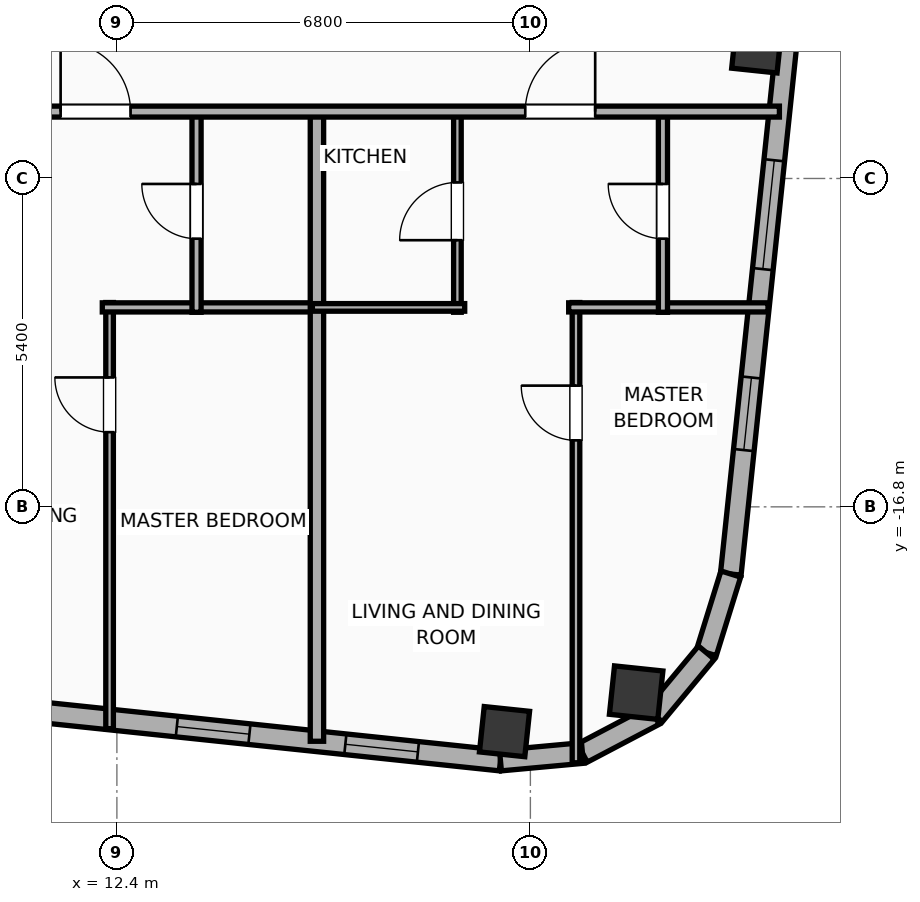
"""IFC4 building model, lengths in metres.
Left out: names, types, materials, properties, quantities, classifications, styles, units other than length and angle.
Written with IfcOpenShell. Run it as: python <this file> out.ifc"""

import sys

from ifc_helpers import new_model, si_unit, direction, frame, frame_2d, origin, origin_2d, place, context, subcontext, project, spatial, rectangle, hollow_rectangle, hollow_circle, extrude, element, fill, save


model = new_model("IFC4")
c1 = context("Model", 3, precision=1e-05, world=origin(), true_north=direction((0.0, 1.0)))
c2 = subcontext(c1, "Body", "Model", "MODEL_VIEW")
j1 = project(units=[si_unit("LENGTHUNIT", "METRE"), si_unit("PLANEANGLEUNIT", "RADIAN")], contexts=[c1])
p1 = place(None, origin())
s1 = spatial("IfcSite", under=j1, at=p1, CompositionType="ELEMENT")
p2 = place(p1, origin())
s2 = spatial("IfcBuilding", under=s1, at=p2, CompositionType="ELEMENT")
p3 = place(p2, frame((0.0, 0.0, 267.8)))
s3 = spatial("IfcBuildingStorey", under=s2, at=p3, CompositionType="ELEMENT", Elevation=267.8)
p4 = place(p3, frame((18.775, -20.497, 0.0), z_axis=(0.0, 0.0, 1.0), x_axis=(0.994521895368, -0.104528463268, 0.0)))
e1 = element("IfcColumn", 1, at=p4, inside=s3, PredefinedType="COLUMN", context=c2, shape_type="SweptSolid", body=[
    extrude(hollow_rectangle(XDim=0.75, YDim=0.75, WallThickness=0.025, at=origin_2d()), origin(), (0.0, 0.0, 1.0), 3.9),
])
p5 = place(p3, frame((20.939, -19.855, 0.0), z_axis=(0.0, 0.0, 1.0), x_axis=(0.994521895368, -0.104528463268, 0.0)))
e2 = element("IfcColumn", 2, at=p5, inside=s3, PredefinedType="COLUMN", context=c2, shape_type="SweptSolid", body=[
    extrude(hollow_circle(Radius=0.4, WallThickness=0.028, at=origin_2d()), origin(), (0.0, 0.0, 1.0), 3.9),
])
p6 = place(p3, frame((22.923, -9.252, 0.0), z_axis=(0.0, 0.0, 1.0), x_axis=(0.994521895368, -0.104528463268, 0.0)))
e3 = element("IfcColumn", 3, at=p6, inside=s3, PredefinedType="COLUMN", context=c2, shape_type="SweptSolid", body=[
    extrude(hollow_rectangle(XDim=0.75, YDim=0.75, WallThickness=0.025, at=origin_2d()), origin(), (0.0, 0.0, 1.0), 3.9),
])
p7 = place(p3, frame((18.708, -20.972, 0.0), z_axis=(0.0, 0.0, 1.0), x_axis=(-0.994521888554, 0.104528528102, 0.0)))
e4 = element("IfcWall", 4, at=p7, inside=s3, PredefinedType="ELEMENTEDWALL", context=c2, shape_type="SweptSolid", body=[
    extrude(rectangle(XDim=46.766, YDim=0.34, at=frame_2d((23.383, 0.0))), origin(), (0.0, 0.0, 1.0), 3.65),
])
p8 = place(p7, frame((23.833, 0.0, 0.75)))
e5 = element("IfcOpeningElement", 5, at=p8, cuts=e4, PredefinedType="OPENING", context=c2, shape_type="SweptSolid", body=[
    extrude(rectangle(XDim=2.4, YDim=2.1, at=frame_2d((1.2, 1.05))), frame((0.0, 0.18, 0.0), z_axis=(0.0, -1.0, 0.0), x_axis=(1.0, 0.0, 0.0)), (0.0, 0.0, 1.0), 0.36),
])
p9 = place(p7, frame((38.622, 0.0, 0.75)))
e6 = element("IfcOpeningElement", 6, at=p9, cuts=e4, PredefinedType="OPENING", context=c2, shape_type="SweptSolid", body=[
    extrude(rectangle(XDim=2.4, YDim=2.1, at=frame_2d((1.2, 1.05))), frame((0.0, 0.18, 0.0), z_axis=(0.0, -1.0, 0.0), x_axis=(1.0, 0.0, 0.0)), (0.0, 0.0, 1.0), 0.36),
])
p10 = place(p7, frame((44.402, 0.0, 0.75)))
e7 = element("IfcOpeningElement", 7, at=p10, cuts=e4, PredefinedType="OPENING", context=c2, shape_type="SweptSolid", body=[
    extrude(rectangle(XDim=1.2, YDim=2.05, at=frame_2d((0.6, 1.025))), frame((0.0, 0.18, 0.0), z_axis=(0.0, -1.0, 0.0), x_axis=(1.0, 0.0, 0.0)), (0.0, 0.0, 1.0), 0.36),
])
p11 = place(p7, frame((42.406, 0.0, 0.75)))
e8 = element("IfcOpeningElement", 8, at=p11, cuts=e4, PredefinedType="OPENING", context=c2, shape_type="SweptSolid", body=[
    extrude(rectangle(XDim=1.2, YDim=2.05, at=frame_2d((0.6, 1.025))), frame((0.0, 0.18, 0.0), z_axis=(0.0, -1.0, 0.0), x_axis=(1.0, 0.0, 0.0)), (0.0, 0.0, 1.0), 0.36),
])
p12 = place(p7, frame((34.933, 0.0, 0.75)))
e9 = element("IfcOpeningElement", 9, at=p12, cuts=e4, PredefinedType="OPENING", context=c2, shape_type="SweptSolid", body=[
    extrude(rectangle(XDim=1.2, YDim=2.05, at=frame_2d((0.6, 1.025))), frame((0.0, 0.18, 0.0), z_axis=(0.0, -1.0, 0.0), x_axis=(1.0, 0.0, 0.0)), (0.0, 0.0, 1.0), 0.36),
])
p13 = place(p7, frame((28.631, 0.0, 0.75)))
e10 = element("IfcOpeningElement", 10, at=p13, cuts=e4, PredefinedType="OPENING", context=c2, shape_type="SweptSolid", body=[
    extrude(rectangle(XDim=1.2, YDim=2.05, at=frame_2d((0.6, 1.025))), frame((0.0, 0.18, 0.0), z_axis=(0.0, -1.0, 0.0), x_axis=(1.0, 0.0, 0.0)), (0.0, 0.0, 1.0), 0.36),
])
p14 = place(p7, frame((30.896, 0.0, 0.75)))
e11 = element("IfcOpeningElement", 11, at=p14, cuts=e4, PredefinedType="OPENING", context=c2, shape_type="SweptSolid", body=[
    extrude(rectangle(XDim=1.2, YDim=2.05, at=frame_2d((0.6, 1.025))), frame((0.0, 0.18, 0.0), z_axis=(0.0, -1.0, 0.0), x_axis=(1.0, 0.0, 0.0)), (0.0, 0.0, 1.0), 0.36),
])
p15 = place(p7, frame((7.497, 0.0, 0.75)))
e12 = element("IfcOpeningElement", 12, at=p15, cuts=e4, PredefinedType="OPENING", context=c2, shape_type="SweptSolid", body=[
    extrude(rectangle(XDim=1.2, YDim=2.05, at=frame_2d((0.6, 1.025))), frame((0.0, 0.18, 0.0), z_axis=(0.0, -1.0, 0.0), x_axis=(1.0, 0.0, 0.0)), (0.0, 0.0, 1.0), 0.36),
])
p16 = place(p7, frame((4.151, 0.0, 0.75)))
e13 = element("IfcOpeningElement", 13, at=p16, cuts=e4, PredefinedType="OPENING", context=c2, shape_type="SweptSolid", body=[
    extrude(rectangle(XDim=1.2, YDim=2.05, at=frame_2d((0.6, 1.025))), frame((0.0, 0.18, 0.0), z_axis=(0.0, -1.0, 0.0), x_axis=(1.0, 0.0, 0.0)), (0.0, 0.0, 1.0), 0.36),
])
p17 = place(p7, frame((1.365, 0.0, 0.75)))
e14 = element("IfcOpeningElement", 14, at=p17, cuts=e4, PredefinedType="OPENING", context=c2, shape_type="SweptSolid", body=[
    extrude(rectangle(XDim=1.2, YDim=2.05, at=frame_2d((0.6, 1.025))), frame((0.0, 0.18, 0.0), z_axis=(0.0, -1.0, 0.0), x_axis=(1.0, 0.0, 0.0)), (0.0, 0.0, 1.0), 0.36),
])
p18 = place(p7, frame((20.254, 0.0, 0.75)))
e15 = element("IfcOpeningElement", 15, at=p18, cuts=e4, PredefinedType="OPENING", context=c2, shape_type="SweptSolid", body=[
    extrude(rectangle(XDim=1.2, YDim=2.05, at=frame_2d((0.6, 1.025))), frame((0.0, 0.18, 0.0), z_axis=(0.0, -1.0, 0.0), x_axis=(1.0, 0.0, 0.0)), (0.0, 0.0, 1.0), 0.36),
])
p19 = place(p7, frame((16.172, 0.0, 0.75)))
e16 = element("IfcOpeningElement", 16, at=p19, cuts=e4, PredefinedType="OPENING", context=c2, shape_type="SweptSolid", body=[
    extrude(rectangle(XDim=1.2, YDim=2.05, at=frame_2d((0.6, 1.025))), frame((0.0, 0.18, 0.0), z_axis=(0.0, -1.0, 0.0), x_axis=(1.0, 0.0, 0.0)), (0.0, 0.0, 1.0), 0.36),
])
p20 = place(p7, frame((12.11, 0.0, 0.75)))
e17 = element("IfcOpeningElement", 17, at=p20, cuts=e4, PredefinedType="OPENING", context=c2, shape_type="SweptSolid", body=[
    extrude(rectangle(XDim=1.2, YDim=2.05, at=frame_2d((0.6, 1.025))), frame((0.0, 0.18, 0.0), z_axis=(0.0, -1.0, 0.0), x_axis=(1.0, 0.0, 0.0)), (0.0, 0.0, 1.0), 0.36),
])
p21 = place(p3, frame((25.67, 12.296, 0.0), z_axis=(0.0, 0.0, 1.0), x_axis=(-0.104533282919, -0.994521388791, 0.0)))
e18 = element("IfcWall", 18, at=p21, inside=s3, PredefinedType="ELEMENTEDWALL", context=c2, shape_type="SweptSolid", body=[
    extrude(rectangle(XDim=30.366, YDim=0.34, at=frame_2d((15.183, 0.0))), origin(), (0.0, 0.0, 1.0), 3.65),
])
p22 = place(p21, frame((5.842, 0.0, 0.75)))
e19 = element("IfcOpeningElement", 19, at=p22, cuts=e18, PredefinedType="OPENING", context=c2, shape_type="SweptSolid", body=[
    extrude(rectangle(XDim=1.8, YDim=2.1, at=frame_2d((0.9, 1.05))), frame((0.0, 0.18, 0.0), z_axis=(0.0, -1.0, 0.0), x_axis=(1.0, 0.0, 0.0)), (0.0, 0.0, 1.0), 0.36),
])
p23 = place(p21, frame((23.525, 0.0, 0.75)))
e20 = element("IfcOpeningElement", 20, at=p23, cuts=e18, PredefinedType="OPENING", context=c2, shape_type="SweptSolid", body=[
    extrude(rectangle(XDim=1.8, YDim=2.1, at=frame_2d((0.9, 1.05))), frame((0.0, 0.18, 0.0), z_axis=(0.0, -1.0, 0.0), x_axis=(1.0, 0.0, 0.0)), (0.0, 0.0, 1.0), 0.36),
])
p24 = place(p21, frame((27.117, 0.0, 0.75)))
e21 = element("IfcOpeningElement", 21, at=p24, cuts=e18, PredefinedType="OPENING", context=c2, shape_type="SweptSolid", body=[
    extrude(rectangle(XDim=1.2, YDim=2.05, at=frame_2d((0.6, 1.025))), frame((0.0, 0.18, 0.0), z_axis=(0.0, -1.0, 0.0), x_axis=(1.0, 0.0, 0.0)), (0.0, 0.0, 1.0), 0.36),
])
p25 = place(p21, frame((17.929, 0.0, 0.75)))
e22 = element("IfcOpeningElement", 22, at=p25, cuts=e18, PredefinedType="OPENING", context=c2, shape_type="SweptSolid", body=[
    extrude(rectangle(XDim=1.2, YDim=2.05, at=frame_2d((0.6, 1.025))), frame((0.0, 0.18, 0.0), z_axis=(0.0, -1.0, 0.0), x_axis=(1.0, 0.0, 0.0)), (0.0, 0.0, 1.0), 0.36),
])
p26 = place(p3, frame((22.496, -17.905, 0.0), z_axis=(0.0, 0.0, 1.0), x_axis=(-0.296416228123, -0.955058856671, 0.0)))
e23 = element("IfcWall", 23, at=p26, inside=s3, PredefinedType="ELEMENTEDWALL", context=c2, shape_type="SweptSolid", body=[
    extrude(rectangle(XDim=1.354, YDim=0.34, at=frame_2d((0.677, 0.0))), origin(), (0.0, 0.0, 1.0), 3.65),
])
p27 = place(p3, frame((22.094, -19.198, 0.0), z_axis=(0.0, 0.0, 1.0), x_axis=(-0.639501603217, -0.768789762863, 0.0)))
e24 = element("IfcWall", 24, at=p27, inside=s3, PredefinedType="ELEMENTEDWALL", context=c2, shape_type="SweptSolid", body=[
    extrude(rectangle(XDim=1.337, YDim=0.34, at=frame_2d((0.668, 0.0))), origin(), (0.0, 0.0, 1.0), 3.65),
])
p28 = place(p3, frame((21.24, -20.226, 0.0), z_axis=(0.0, 0.0, 1.0), x_axis=(-0.884922182678, -0.465738908193, 0.0)))
e25 = element("IfcWall", 25, at=p28, inside=s3, PredefinedType="ELEMENTEDWALL", context=c2, shape_type="SweptSolid", body=[
    extrude(rectangle(XDim=1.337, YDim=0.34, at=frame_2d((0.668, 0.0))), origin(), (0.0, 0.0, 1.0), 3.65),
])
p29 = place(p3, frame((20.056, -20.848, 0.0), z_axis=(0.0, 0.0, 1.0), x_axis=(-0.995813013343, -0.091413579172, 0.0)))
e26 = element("IfcWall", 26, at=p29, inside=s3, PredefinedType="ELEMENTEDWALL", context=c2, shape_type="SweptSolid", body=[
    extrude(rectangle(XDim=1.354, YDim=0.34, at=frame_2d((0.677, 0.0))), origin(), (0.0, 0.0, 1.0), 3.65),
])
p30 = place(p3, frame((12.28, -20.448, 0.0), z_axis=(0.0, 0.0, 1.0), x_axis=(0.0, 1.0, 0.0)))
e27 = element("IfcWall", 27, at=p30, inside=s3, PredefinedType="PARTITIONING", context=c2, shape_type="SweptSolid", body=[
    extrude(rectangle(XDim=7.008, YDim=0.125, at=frame_2d((3.504, 0.0))), origin(), (0.0, 0.0, 1.0), 3.65),
])
p31 = place(p30, frame((4.875, 0.0, 0.0)))
e28 = element("IfcOpeningElement", 28, at=p31, cuts=e27, PredefinedType="OPENING", context=c2, shape_type="SweptSolid", body=[
    extrude(rectangle(XDim=0.9, YDim=2.05, at=frame_2d((0.45, 1.025))), frame((0.0, 0.073, 0.0), z_axis=(0.0, -1.0, 0.0), x_axis=(1.0, 0.0, 0.0)), (0.0, 0.0, 1.0), 0.145),
])
p32 = place(p3, frame((12.16, -13.52, 0.0), z_axis=(0.0, 0.0, 1.0), x_axis=(1.0, 0.0, 0.0)))
e29 = element("IfcWall", 29, at=p32, inside=s3, PredefinedType="PLUMBINGWALL", context=c2, shape_type="SweptSolid", body=[
    extrude(rectangle(XDim=3.605, YDim=0.15, at=frame_2d((1.802, 0.0))), origin(), (0.0, 0.0, 1.0), 3.65),
])
p33 = place(p3, frame((13.71, -13.6, 0.0), z_axis=(0.0, 0.0, 1.0), x_axis=(0.0, 1.0, 0.0)))
e30 = element("IfcWall", 30, at=p33, inside=s3, PredefinedType="PLUMBINGWALL", context=c2, shape_type="SweptSolid", body=[
    extrude(rectangle(XDim=3.32, YDim=0.15, at=frame_2d((1.66, 0.0))), origin(), (0.0, 0.0, 1.0), 3.65),
])
p34 = place(p33, frame((1.21, 0.0, 0.0)))
e31 = element("IfcOpeningElement", 31, at=p34, cuts=e30, PredefinedType="OPENING", context=c2, shape_type="SweptSolid", body=[
    extrude(rectangle(XDim=0.9, YDim=2.05, at=frame_2d((0.45, 1.025))), frame((0.0, 0.085, 0.0), z_axis=(0.0, -1.0, 0.0), x_axis=(1.0, 0.0, 0.0)), (0.0, 0.0, 1.0), 0.17),
])
p35 = place(p3, frame((15.69, -20.655, 0.0), z_axis=(0.0, 0.0, 1.0), x_axis=(0.0, 1.0, 0.0)))
e32 = element("IfcWall", 32, at=p35, inside=s3, PredefinedType="PARTITIONING", context=c2, shape_type="SweptSolid", body=[
    extrude(rectangle(XDim=10.435, YDim=0.22, at=frame_2d((5.218, 0.0))), origin(), (0.0, 0.0, 1.0), 3.65),
])
p36 = place(p3, frame((19.95, -21.009, 0.0), z_axis=(0.0, 0.0, 1.0), x_axis=(0.0, 1.0, 0.0)))
e33 = element("IfcWall", 33, at=p36, inside=s3, PredefinedType="PARTITIONING", context=c2, shape_type="SweptSolid", body=[
    extrude(rectangle(XDim=7.569, YDim=0.125, at=frame_2d((3.784, 0.0))), origin(), (0.0, 0.0, 1.0), 3.65),
])
p37 = place(p36, frame((5.302, 0.0, 0.0)))
e34 = element("IfcOpeningElement", 34, at=p37, cuts=e33, PredefinedType="OPENING", context=c2, shape_type="SweptSolid", body=[
    extrude(rectangle(XDim=0.9, YDim=2.05, at=frame_2d((0.45, 1.025))), frame((0.0, 0.073, 0.0), z_axis=(0.0, -1.0, 0.0), x_axis=(1.0, 0.0, 0.0)), (0.0, 0.0, 1.0), 0.145),
])
p38 = place(p3, frame((19.83, -13.52, 0.0), z_axis=(0.0, 0.0, 1.0), x_axis=(1.0, 0.0, 0.0)))
e35 = element("IfcWall", 35, at=p38, inside=s3, PredefinedType="PLUMBINGWALL", context=c2, shape_type="SweptSolid", body=[
    extrude(rectangle(XDim=3.278, YDim=0.15, at=frame_2d((1.639, 0.0))), origin(), (0.0, 0.0, 1.0), 3.65),
])
p39 = place(p3, frame((18.0, -13.6, 0.0), z_axis=(0.0, 0.0, 1.0), x_axis=(0.0, 1.0, 0.0)))
e36 = element("IfcWall", 36, at=p39, inside=s3, PredefinedType="PARTITIONING", context=c2, shape_type="SweptSolid", body=[
    extrude(rectangle(XDim=3.32, YDim=0.125, at=frame_2d((1.66, 0.0))), origin(), (0.0, 0.0, 1.0), 3.65),
])
p40 = place(p39, frame((1.185, 0.0, 0.0)))
e37 = element("IfcOpeningElement", 37, at=p40, cuts=e36, PredefinedType="OPENING", context=c2, shape_type="SweptSolid", body=[
    extrude(rectangle(XDim=0.95, YDim=2.05, at=frame_2d((0.475, 1.025))), frame((0.0, 0.073, 0.0), z_axis=(0.0, -1.0, 0.0), x_axis=(1.0, 0.0, 0.0)), (0.0, 0.0, 1.0), 0.145),
])
p41 = place(p3, frame((15.615, -13.52, 0.0), z_axis=(0.0, 0.0, 1.0), x_axis=(1.0, 0.0, 0.0)))
e38 = element("IfcWall", 38, at=p41, inside=s3, PredefinedType="PARTITIONING", context=c2, shape_type="SweptSolid", body=[
    extrude(rectangle(XDim=2.505, YDim=0.125, at=frame_2d((1.252, 0.0))), origin(), (0.0, 0.0, 1.0), 3.65),
])
p42 = place(p3, frame((21.38, -13.6, 0.0), z_axis=(0.0, 0.0, 1.0), x_axis=(0.0, 1.0, 0.0)))
e39 = element("IfcWall", 39, at=p42, inside=s3, PredefinedType="PLUMBINGWALL", context=c2, shape_type="SweptSolid", body=[
    extrude(rectangle(XDim=3.32, YDim=0.15, at=frame_2d((1.66, 0.0))), origin(), (0.0, 0.0, 1.0), 3.65),
])
p43 = place(p42, frame((1.21, 0.0, 0.0)))
e40 = element("IfcOpeningElement", 40, at=p43, cuts=e39, PredefinedType="OPENING", context=c2, shape_type="SweptSolid", body=[
    extrude(rectangle(XDim=0.9, YDim=2.05, at=frame_2d((0.45, 1.025))), frame((0.0, 0.085, 0.0), z_axis=(0.0, -1.0, 0.0), x_axis=(1.0, 0.0, 0.0)), (0.0, 0.0, 1.0), 0.17),
])
p44 = place(p3, frame((8.08, -10.3, 0.0), z_axis=(0.0, 0.0, 1.0), x_axis=(1.0, 0.0, 0.0)))
e41 = element("IfcWall", 41, at=p44, inside=s3, PredefinedType="PARTITIONING", context=c2, shape_type="SweptSolid", body=[
    extrude(rectangle(XDim=15.215, YDim=0.18, at=frame_2d((7.607, 0.0))), origin(), (0.0, 0.0, 1.0), 3.65),
])
p45 = place(p44, frame((3.395, 0.0, 0.0)))
e42 = element("IfcOpeningElement", 42, at=p45, cuts=e41, PredefinedType="OPENING", context=c2, shape_type="SweptSolid", body=[
    extrude(rectangle(XDim=1.15, YDim=2.05, at=frame_2d((0.575, 1.025))), frame((0.0, 0.1, 0.0), z_axis=(0.0, -1.0, 0.0), x_axis=(1.0, 0.0, 0.0)), (0.0, 0.0, 1.0), 0.2),
])
p46 = place(p44, frame((11.036, 0.0, 0.0)))
e43 = element("IfcOpeningElement", 43, at=p46, cuts=e41, PredefinedType="OPENING", context=c2, shape_type="SweptSolid", body=[
    extrude(rectangle(XDim=1.15, YDim=2.05, at=frame_2d((0.575, 1.025))), frame((0.0, 0.1, 0.0), z_axis=(0.0, -1.0, 0.0), x_axis=(1.0, 0.0, 0.0)), (0.0, 0.0, 1.0), 0.2),
])
p47 = place(p23, origin())
e44 = element("IfcWindow", 44, at=p47, inside=s3, PartitioningType="SINGLE_PANEL", PredefinedType="WINDOW", context=c2, shape_type="SweptSolid", body=[
    extrude(rectangle(XDim=1.8, YDim=2.1, at=frame_2d((0.9, 1.05))), frame((0.0, 0.03, 0.0), z_axis=(0.0, -1.0, 0.0), x_axis=(1.0, 0.0, 0.0)), (0.0, 0.0, 1.0), 0.06),
])
fill(e20, e44)
p48 = place(p16, origin())
e45 = element("IfcWindow", 45, at=p48, inside=s3, PartitioningType="SINGLE_PANEL", PredefinedType="WINDOW", context=c2, shape_type="SweptSolid", body=[
    extrude(rectangle(XDim=1.2, YDim=2.05, at=frame_2d((0.6, 1.025))), frame((0.0, 0.03, 0.0), z_axis=(0.0, -1.0, 0.0), x_axis=(1.0, 0.0, 0.0)), (0.0, 0.0, 1.0), 0.06),
])
fill(e13, e45)
p49 = place(p17, origin())
e46 = element("IfcWindow", 46, at=p49, inside=s3, PartitioningType="SINGLE_PANEL", PredefinedType="WINDOW", context=c2, shape_type="SweptSolid", body=[
    extrude(rectangle(XDim=1.2, YDim=2.05, at=frame_2d((0.6, 1.025))), frame((0.0, 0.03, 0.0), z_axis=(0.0, -1.0, 0.0), x_axis=(1.0, 0.0, 0.0)), (0.0, 0.0, 1.0), 0.06),
])
fill(e14, e46)
p50 = place(p24, origin())
e47 = element("IfcWindow", 47, at=p50, inside=s3, PartitioningType="SINGLE_PANEL", PredefinedType="WINDOW", context=c2, shape_type="SweptSolid", body=[
    extrude(rectangle(XDim=1.2, YDim=2.05, at=frame_2d((0.6, 1.025))), frame((0.0, 0.03, 0.0), z_axis=(0.0, -1.0, 0.0), x_axis=(1.0, 0.0, 0.0)), (0.0, 0.0, 1.0), 0.06),
])
fill(e21, e47)
p51 = place(p31, origin())
e48 = element("IfcDoor", 48, at=p51, inside=s3, OperationType="SINGLE_SWING_RIGHT", PredefinedType="DOOR", context=c2, shape_type="SweptSolid", body=[
    extrude(rectangle(XDim=0.9, YDim=2.05, at=frame_2d((0.45, 1.025))), frame((0.0, 0.025, 0.0), z_axis=(0.0, -1.0, 0.0), x_axis=(1.0, 0.0, 0.0)), (0.0, 0.0, 1.0), 0.05),
])
fill(e28, e48)
p52 = place(p34, origin())
e49 = element("IfcDoor", 49, at=p52, inside=s3, OperationType="SINGLE_SWING_RIGHT", PredefinedType="DOOR", context=c2, shape_type="SweptSolid", body=[
    extrude(rectangle(XDim=0.9, YDim=2.05, at=frame_2d((0.45, 1.025))), frame((0.0, 0.025, 0.0), z_axis=(0.0, -1.0, 0.0), x_axis=(1.0, 0.0, 0.0)), (0.0, 0.0, 1.0), 0.05),
])
fill(e31, e49)
p53 = place(p37, origin())
e50 = element("IfcDoor", 50, at=p53, inside=s3, OperationType="SINGLE_SWING_RIGHT", PredefinedType="DOOR", context=c2, shape_type="SweptSolid", body=[
    extrude(rectangle(XDim=0.9, YDim=2.05, at=frame_2d((0.45, 1.025))), frame((0.0, 0.025, 0.0), z_axis=(0.0, -1.0, 0.0), x_axis=(1.0, 0.0, 0.0)), (0.0, 0.0, 1.0), 0.05),
])
fill(e34, e50)
p54 = place(p40, origin())
e51 = element("IfcDoor", 51, at=p54, inside=s3, OperationType="SINGLE_SWING_LEFT", PredefinedType="DOOR", context=c2, shape_type="SweptSolid", body=[
    extrude(rectangle(XDim=0.95, YDim=2.05, at=frame_2d((0.475, 1.025))), frame((0.0, 0.025, 0.0), z_axis=(0.0, -1.0, 0.0), x_axis=(1.0, 0.0, 0.0)), (0.0, 0.0, 1.0), 0.05),
])
fill(e37, e51)
p55 = place(p43, origin())
e52 = element("IfcDoor", 52, at=p55, inside=s3, OperationType="SINGLE_SWING_RIGHT", PredefinedType="DOOR", context=c2, shape_type="SweptSolid", body=[
    extrude(rectangle(XDim=0.9, YDim=2.05, at=frame_2d((0.45, 1.025))), frame((0.0, 0.025, 0.0), z_axis=(0.0, -1.0, 0.0), x_axis=(1.0, 0.0, 0.0)), (0.0, 0.0, 1.0), 0.05),
])
fill(e40, e52)
p56 = place(p45, origin())
e53 = element("IfcDoor", 53, at=p56, inside=s3, OperationType="SINGLE_SWING_LEFT", PredefinedType="DOOR", context=c2, shape_type="SweptSolid", body=[
    extrude(rectangle(XDim=1.15, YDim=2.05, at=frame_2d((0.575, 1.025))), frame((0.0, 0.025, 0.0), z_axis=(0.0, -1.0, 0.0), x_axis=(1.0, 0.0, 0.0)), (0.0, 0.0, 1.0), 0.05),
])
fill(e42, e53)
p57 = place(p46, origin())
e54 = element("IfcDoor", 54, at=p57, inside=s3, OperationType="SINGLE_SWING_RIGHT", PredefinedType="DOOR", context=c2, shape_type="SweptSolid", body=[
    extrude(rectangle(XDim=1.15, YDim=2.05, at=frame_2d((0.575, 1.025))), frame((0.0, 0.025, 0.0), z_axis=(0.0, -1.0, 0.0), x_axis=(1.0, 0.0, 0.0)), (0.0, 0.0, 1.0), 0.05),
])
fill(e43, e54)
save(model, sys.argv[1])
